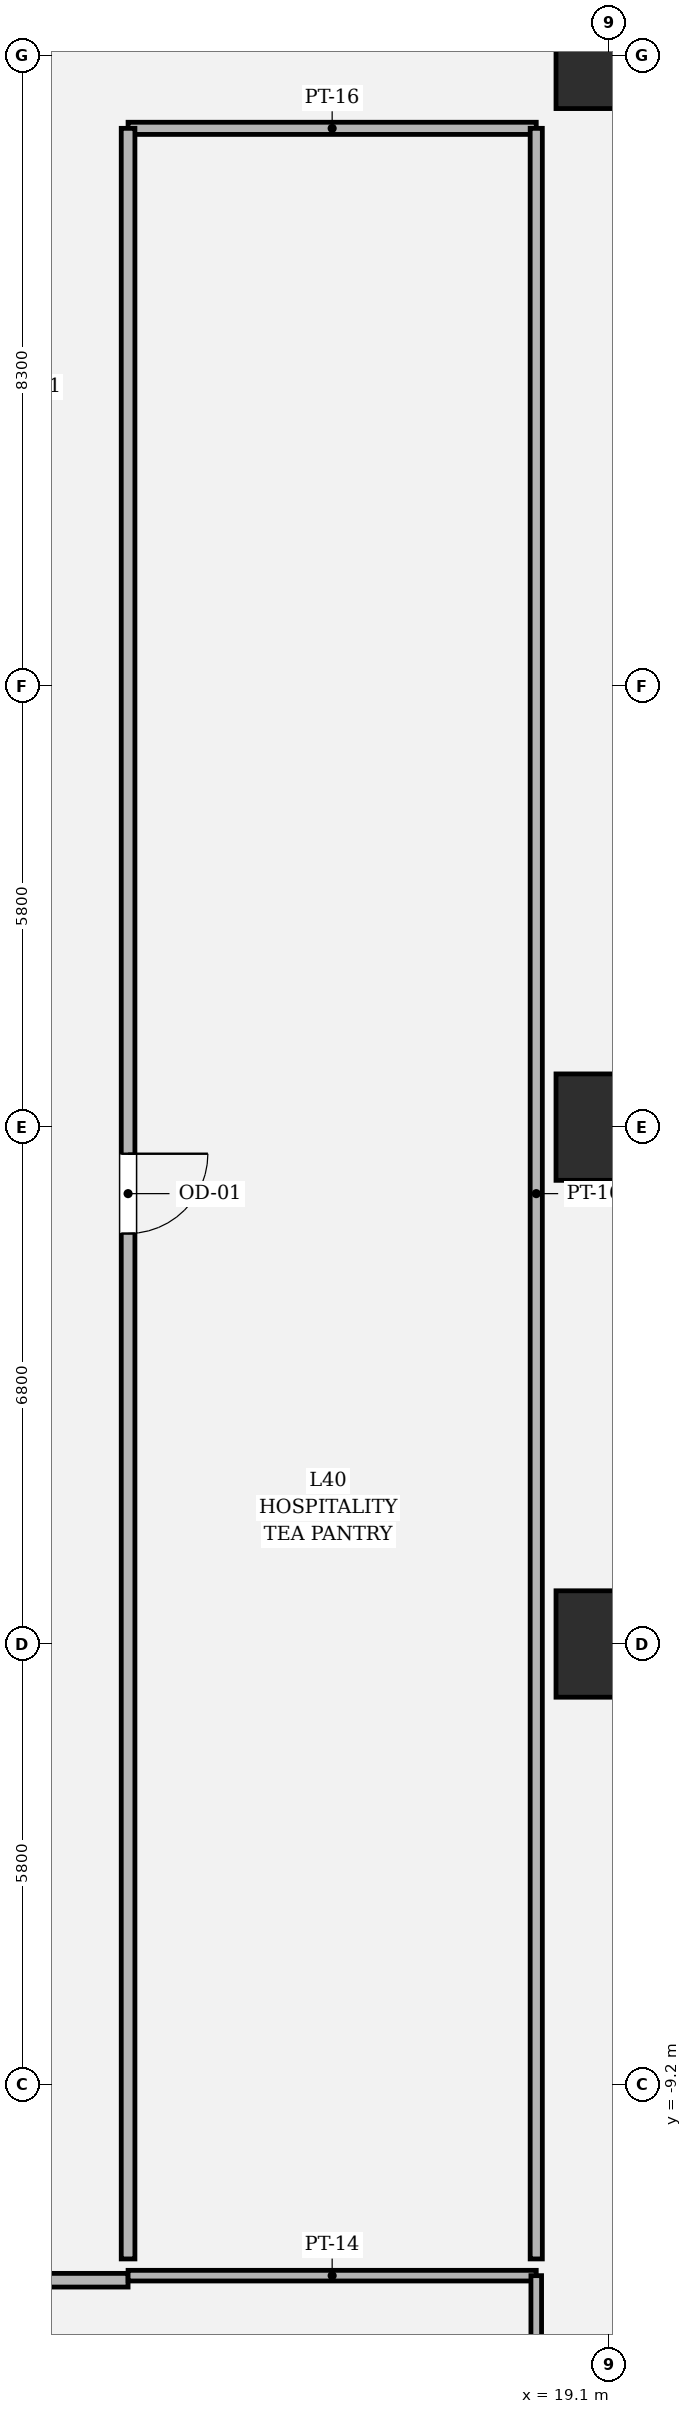
"""IFC4 building model, lengths in metres.
Left out: names, types, materials, properties, quantities, classifications, styles, units other than length and angle.
Written with IfcOpenShell. Run it as: python <this file> out.ifc"""

import sys

from ifc_helpers import new_model, si_unit, direction, frame, frame_2d, origin, origin_2d, place, context, subcontext, project, spatial, rectangle, hollow_rectangle, extrude, element, fill, save


model = new_model("IFC4")
c1 = context("Model", 3, precision=1e-05, world=origin(), true_north=direction((0.0, 1.0)))
c2 = subcontext(c1, "Body", "Model", "MODEL_VIEW")
j1 = project(units=[si_unit("LENGTHUNIT", "METRE"), si_unit("PLANEANGLEUNIT", "RADIAN")], contexts=[c1])
p1 = place(None, origin())
s1 = spatial("IfcSite", under=j1, at=p1, CompositionType="ELEMENT")
p2 = place(p1, origin())
s2 = spatial("IfcBuilding", under=s1, at=p2, CompositionType="ELEMENT")
p3 = place(p2, frame((0.0, 0.0, 172.2)))
s3 = spatial("IfcBuildingStorey", under=s2, at=p3, CompositionType="ELEMENT", Elevation=172.2)
for number, where, z_axis, x_axis in (
    (1, (19.1, -3.4, 0.0), (0.0, 0.0, 1.0), (1.0, 0.0, 0.0)),
    (2, (19.1, 3.4, 0.0), (0.0, 0.0, 1.0), (1.0, 0.0, 0.0)),
    (3, (19.1, 17.5, 0.0), (0.0, 0.0, 1.0), (1.0, 0.0, 0.0)),
):
    element("IfcColumn", number, at=place(p3, frame(where, z_axis=z_axis, x_axis=x_axis)), inside=s3, PredefinedType="COLUMN", context=c2, shape_type="SweptSolid", body=[
        extrude(hollow_rectangle(XDim=1.4, YDim=1.4, WallThickness=0.042, at=origin_2d()), origin(), (0.0, 0.0, 1.0), 4.05),
    ])
p4 = place(p3, frame((19.646, 16.949, 0.0), z_axis=(0.0, 0.0, 1.0), x_axis=(-0.707106781187, 0.707106781187, 0.0)))
e4 = element("IfcWall", 4, at=p4, inside=s3, PredefinedType="SOLIDWALL", context=c2, shape_type="SweptSolid", body=[
    extrude(rectangle(XDim=1.552, YDim=0.32, at=frame_2d((0.776, 0.0))), origin(), (0.0, 0.0, 1.0), 3.174),
])
p5 = place(p3, frame((-2.34, -11.77, 0.0), z_axis=(0.0, 0.0, 1.0), x_axis=(1.0, 0.0, 0.0)))
e5 = element("IfcWall", 5, at=p5, inside=s3, PredefinedType="PARTITIONING", context=c2, shape_type="SweptSolid", body=[
    extrude(rectangle(XDim=15.11, YDim=0.18, at=frame_2d((7.555, 0.0))), origin(), (0.0, 0.0, 1.0), 3.174),
])
p6 = place(p5, frame((6.855, 0.0, 0.0)))
e6 = element("IfcOpeningElement", 6, at=p6, cuts=e5, PredefinedType="OPENING", context=c2, shape_type="SweptSolid", body=[
    extrude(rectangle(XDim=1.4, YDim=2.25, at=frame_2d((0.7, 1.125))), frame((0.0, 0.1, 0.0), z_axis=(0.0, -1.0, 0.0), x_axis=(1.0, 0.0, 0.0)), (0.0, 0.0, 1.0), 0.2),
])
p7 = place(p3, frame((12.77, -11.71, 0.0), z_axis=(0.0, 0.0, 1.0), x_axis=(1.0, 0.0, 0.0)))
e7 = element("IfcWall", 7, at=p7, inside=s3, PredefinedType="PARTITIONING", context=c2, shape_type="SweptSolid", body=[
    extrude(rectangle(XDim=5.37, YDim=0.14, at=frame_2d((2.685, 0.0))), origin(), (0.0, 0.0, 1.0), 3.424),
])
p8 = place(p3, frame((18.14, -11.71, 0.0), z_axis=(0.0, 0.0, 1.0), x_axis=(0.0, -1.0, 0.0)))
e8 = element("IfcWall", 8, at=p8, inside=s3, PredefinedType="PARTITIONING", context=c2, shape_type="SweptSolid", body=[
    extrude(rectangle(XDim=10.73, YDim=0.14, at=frame_2d((5.365, 0.0))), origin(), (0.0, 0.0, 1.0), 3.174),
])
p9 = place(p3, frame((12.77, 16.54, 0.0), z_axis=(0.0, 0.0, 1.0), x_axis=(1.0, 0.0, 0.0)))
e9 = element("IfcWall", 9, at=p9, inside=s3, PredefinedType="PARTITIONING", context=c2, shape_type="SweptSolid", body=[
    extrude(rectangle(XDim=5.37, YDim=0.16, at=frame_2d((2.685, 0.0))), origin(), (0.0, 0.0, 1.0), 3.424),
])
p10 = place(p3, frame((18.14, 16.54, 0.0), z_axis=(0.0, 0.0, 1.0), x_axis=(0.0, -1.0, 0.0)))
e10 = element("IfcWall", 10, at=p10, inside=s3, PredefinedType="PARTITIONING", context=c2, shape_type="SweptSolid", body=[
    extrude(rectangle(XDim=28.03, YDim=0.16, at=frame_2d((14.015, 0.0))), origin(), (0.0, 0.0, 1.0), 3.174),
])
p11 = place(p3, frame((12.77, -11.49, 0.0), z_axis=(0.0, 0.0, 1.0), x_axis=(0.0, 1.0, 0.0)))
e11 = element("IfcWall", 11, at=p11, inside=s3, PredefinedType="PARTITIONING", context=c2, shape_type="SweptSolid", body=[
    extrude(rectangle(XDim=28.03, YDim=0.18, at=frame_2d((14.015, 0.0))), origin(), (0.0, 0.0, 1.0), 3.174),
])
p12 = place(p11, frame((13.49, 0.0, 0.0)))
e12 = element("IfcOpeningElement", 12, at=p12, cuts=e11, PredefinedType="OPENING", context=c2, shape_type="SweptSolid", body=[
    extrude(rectangle(XDim=1.05, YDim=2.2, at=frame_2d((0.525, 1.1))), frame((0.0, 0.1, 0.0), z_axis=(0.0, -1.0, 0.0), x_axis=(1.0, 0.0, 0.0)), (0.0, 0.0, 1.0), 0.2),
])
p13 = place(p12, origin())
e13 = element("IfcDoor", 13, at=p13, inside=s3, OperationType="SINGLE_SWING_RIGHT", PredefinedType="DOOR", context=c2, shape_type="SweptSolid", body=[
    extrude(rectangle(XDim=1.05, YDim=2.2, at=frame_2d((0.525, 1.1))), frame((0.0, 0.025, 0.0), z_axis=(0.0, -1.0, 0.0), x_axis=(1.0, 0.0, 0.0)), (0.0, 0.0, 1.0), 0.05),
])
fill(e12, e13)
save(model, sys.argv[1])
